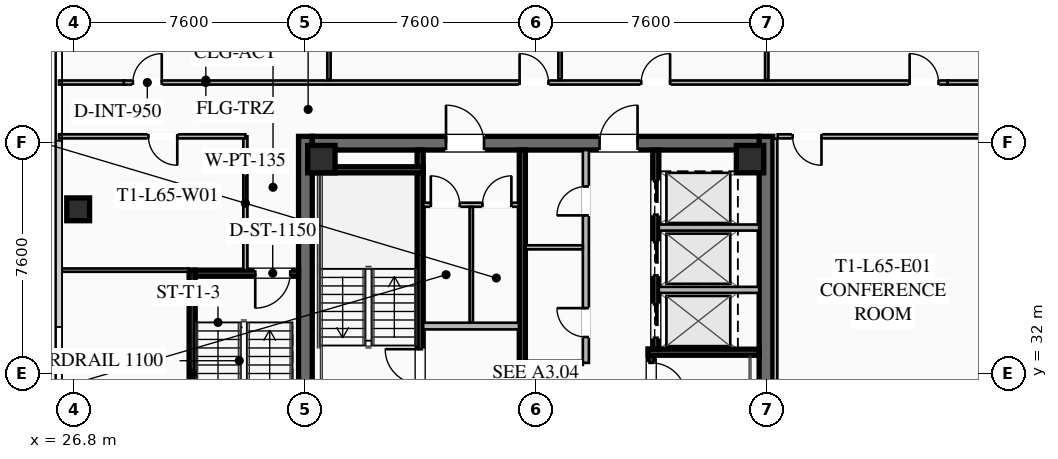
"""IFC4 building model, lengths in metres.
Left out: names, types, materials, properties, quantities, classifications, styles, units other than length and angle.
Written with IfcOpenShell. Run it as: python <this file> out.ifc"""

import sys

from ifc_helpers import new_model, si_unit, direction, frame, frame_2d, origin, origin_2d, place, context, subcontext, project, spatial, rectangle, hollow_rectangle, extrude, element, fill, save


model = new_model("IFC4")
c1 = context("Model", 3, precision=1e-05, world=origin(), true_north=direction((0.0, 1.0)))
c2 = subcontext(c1, "Body", "Model", "MODEL_VIEW")
j1 = project(units=[si_unit("LENGTHUNIT", "METRE"), si_unit("PLANEANGLEUNIT", "RADIAN")], contexts=[c1])
p1 = place(None, origin())
s1 = spatial("IfcSite", under=j1, at=p1, CompositionType="ELEMENT")
p2 = place(p1, origin())
s2 = spatial("IfcBuilding", under=s1, at=p2, CompositionType="ELEMENT")
p3 = place(p2, frame((0.0, 0.0, 239.7)))
s3 = spatial("IfcBuildingStorey", under=s2, at=p3, CompositionType="ELEMENT", Elevation=239.7)
for number, where, z_axis, x_axis in (
    (1, (34.425, 24.2, 0.0), (0.0, 0.0, 1.0), (0.0, 1.0, 0.0)),
    (2, (49.575, 39.8, 0.0), (0.0, 0.0, 1.0), (0.0, -1.0, 0.0)),
):
    element("IfcWall", number, at=place(p3, frame(where, z_axis=z_axis, x_axis=x_axis)), inside=s3, PredefinedType="SHEAR", context=c2, shape_type="SweptSolid", body=[
        extrude(rectangle(XDim=15.6, YDim=0.45, at=frame_2d((7.8, 0.0))), origin(), (0.0, 0.0, 1.0), 3.55),
    ])
p4 = place(p3, frame((34.65, 39.575, 0.0), z_axis=(0.0, 0.0, 1.0), x_axis=(1.0, 0.0, 0.0)))
e3 = element("IfcWall", 3, at=p4, inside=s3, PredefinedType="SHEAR", context=c2, shape_type="SweptSolid", body=[
    extrude(rectangle(XDim=14.7, YDim=0.45, at=frame_2d((7.35, 0.0))), origin(), (0.0, 0.0, 1.0), 3.55),
])
p5 = place(p4, frame((4.4, 0.0, 0.0)))
e4 = element("IfcOpeningElement", 4, at=p5, cuts=e3, PredefinedType="OPENING", context=c2, shape_type="SweptSolid", body=[
    extrude(rectangle(XDim=1.25, YDim=2.25, at=frame_2d((0.625, 1.125))), frame((0.0, 0.235, 0.0), z_axis=(0.0, -1.0, 0.0), x_axis=(1.0, 0.0, 0.0)), (0.0, 0.0, 1.0), 0.47),
])
p6 = place(p4, frame((9.45, 0.0, 0.0)))
e5 = element("IfcOpeningElement", 5, at=p6, cuts=e3, PredefinedType="OPENING", context=c2, shape_type="SweptSolid", body=[
    extrude(rectangle(XDim=1.25, YDim=2.25, at=frame_2d((0.625, 1.125))), frame((0.0, 0.235, 0.0), z_axis=(0.0, -1.0, 0.0), x_axis=(1.0, 0.0, 0.0)), (0.0, 0.0, 1.0), 0.47),
])
for number, where, z_axis, x_axis in (
    (6, (49.05, 39.05, 0.0), (0.0, 0.0, 1.0), (1.0, 0.0, 0.0)),
    (7, (34.95, 39.05, 0.0), (0.0, 0.0, 1.0), (1.0, 0.0, 0.0)),
):
    element("IfcColumn", number, at=place(p3, frame(where, z_axis=z_axis, x_axis=x_axis)), inside=s3, PredefinedType="COLUMN", context=c2, shape_type="SweptSolid", body=[
        extrude(hollow_rectangle(XDim=0.9, YDim=0.9, WallThickness=0.04, at=origin_2d()), origin(), (0.0, 0.0, 1.0), 3.37),
    ])
p7 = place(p3, frame((26.95, 37.4, 0.0), z_axis=(0.0, 0.0, 1.0), x_axis=(1.0, 0.0, 0.0)))
e8 = element("IfcColumn", 8, at=p7, inside=s3, PredefinedType="COLUMN", context=c2, shape_type="SweptSolid", body=[
    extrude(hollow_rectangle(XDim=0.75, YDim=0.75, WallThickness=0.032, at=origin_2d()), origin(), (0.0, 0.0, 1.0), 3.37),
])
p8 = place(p3, frame((38.2, 31.2, 0.0), z_axis=(0.0, 0.0, 1.0), x_axis=(0.0, 1.0, 0.0)))
e9 = element("IfcWall", 9, at=p8, inside=s3, PredefinedType="SHEAR", context=c2, shape_type="SweptSolid", body=[
    extrude(rectangle(XDim=8.15, YDim=0.2, at=frame_2d((4.075, 0.0))), origin(), (0.0, 0.0, 1.0), 3.37),
])
p9 = place(p8, frame((0.45, 0.0, 0.0)))
e10 = element("IfcOpeningElement", 10, at=p9, cuts=e9, PredefinedType="OPENING", context=c2, shape_type="SweptSolid", body=[
    extrude(rectangle(XDim=1.15, YDim=2.2, at=frame_2d((0.575, 1.1))), frame((0.0, 0.11, 0.0), z_axis=(0.0, -1.0, 0.0), x_axis=(1.0, 0.0, 0.0)), (0.0, 0.0, 1.0), 0.22),
])
p10 = place(p3, frame((34.65, 38.7, 0.0), z_axis=(0.0, 0.0, 1.0), x_axis=(1.0, 0.0, 0.0)))
e11 = element("IfcWall", 11, at=p10, inside=s3, PredefinedType="SHEAR", context=c2, shape_type="SweptSolid", body=[
    extrude(rectangle(XDim=3.65, YDim=0.2, at=frame_2d((1.825, 0.0))), origin(), (0.0, 0.0, 1.0), 3.37),
])
p11 = place(p3, frame((45.8, 32.8, 0.0), z_axis=(0.0, 0.0, 1.0), x_axis=(0.0, -1.0, 0.0)))
e12 = element("IfcWall", 12, at=p11, inside=s3, PredefinedType="SHEAR", context=c2, shape_type="SweptSolid", body=[
    extrude(rectangle(XDim=8.15, YDim=0.2, at=frame_2d((4.075, 0.0))), origin(), (0.0, 0.0, 1.0), 3.37),
])
p12 = place(p11, frame((0.45, 0.0, 0.0)))
e13 = element("IfcOpeningElement", 13, at=p12, cuts=e12, PredefinedType="OPENING", context=c2, shape_type="SweptSolid", body=[
    extrude(rectangle(XDim=1.15, YDim=2.2, at=frame_2d((0.575, 1.1))), frame((0.0, 0.11, 0.0), z_axis=(0.0, -1.0, 0.0), x_axis=(1.0, 0.0, 0.0)), (0.0, 0.0, 1.0), 0.22),
])
p13 = place(p3, frame((45.7, 32.7, 0.0), z_axis=(0.0, 0.0, 1.0), x_axis=(1.0, 0.0, 0.0)))
e14 = element("IfcWall", 14, at=p13, inside=s3, PredefinedType="SHEAR", context=c2, shape_type="SweptSolid", body=[
    extrude(rectangle(XDim=3.65, YDim=0.2, at=frame_2d((1.825, 0.0))), origin(), (0.0, 0.0, 1.0), 3.37),
])
p14 = place(p3, frame((41.56, 24.65, 0.0), z_axis=(0.0, 0.0, 1.0), x_axis=(0.0, 1.0, 0.0)))
e15 = element("IfcWall", 15, at=p14, inside=s3, PredefinedType="SHEAR", context=c2, shape_type="SweptSolid", body=[
    extrude(rectangle(XDim=14.7, YDim=0.2, at=frame_2d((7.35, 0.0))), origin(), (0.0, 0.0, 1.0), 3.37),
])
p15 = place(p3, frame((38.3, 33.56, 0.0), z_axis=(0.0, 0.0, 1.0), x_axis=(1.0, 0.0, 0.0)))
e16 = element("IfcWall", 16, at=p15, inside=s3, PredefinedType="SOLIDWALL", context=c2, shape_type="SweptSolid", body=[
    extrude(rectangle(XDim=3.15, YDim=0.22, at=frame_2d((1.575, 0.0))), origin(), (0.0, 0.0, 1.0), 2.723),
])
p16 = place(p3, frame((45.95, 39.35, 0.0), z_axis=(0.0, 0.0, 1.0), x_axis=(0.0, -1.0, 0.0)))
e17 = element("IfcWall", 17, at=p16, inside=s3, PredefinedType="SHEAR", context=c2, shape_type="SweptSolid", body=[
    extrude(rectangle(XDim=6.55, YDim=0.2, at=frame_2d((3.275, 0.0))), origin(), (0.0, 0.0, 1.0), 3.37),
])
p17 = place(p16, frame((5.075, 0.0, 0.0)))
e18 = element("IfcOpeningElement", 18, at=p17, cuts=e17, PredefinedType="OPENING", context=c2, shape_type="SweptSolid", body=[
    extrude(rectangle(XDim=1.1, YDim=2.2, at=frame_2d((0.55, 1.1))), frame((0.0, 0.11, 0.0), z_axis=(0.0, -1.0, 0.0), x_axis=(1.0, 0.0, 0.0)), (0.0, 0.0, 1.0), 0.22),
])
p18 = place(p16, frame((3.025, 0.0, 0.0)))
e19 = element("IfcOpeningElement", 19, at=p18, cuts=e17, PredefinedType="OPENING", context=c2, shape_type="SweptSolid", body=[
    extrude(rectangle(XDim=1.1, YDim=2.2, at=frame_2d((0.55, 1.1))), frame((0.0, 0.11, 0.0), z_axis=(0.0, -1.0, 0.0), x_axis=(1.0, 0.0, 0.0)), (0.0, 0.0, 1.0), 0.22),
])
p19 = place(p16, frame((1.025, 0.0, 0.0)))
e20 = element("IfcOpeningElement", 20, at=p19, cuts=e17, PredefinedType="OPENING", context=c2, shape_type="SweptSolid", body=[
    extrude(rectangle(XDim=1.1, YDim=2.2, at=frame_2d((0.55, 1.1))), frame((0.0, 0.11, 0.0), z_axis=(0.0, -1.0, 0.0), x_axis=(1.0, 0.0, 0.0)), (0.0, 0.0, 1.0), 0.22),
])
for number, where, z_axis, x_axis in (
    (21, (46.05, 34.75, 0.0), (0.0, 0.0, 1.0), (1.0, 0.0, 0.0)),
    (22, (46.05, 36.8, 0.0), (0.0, 0.0, 1.0), (1.0, 0.0, 0.0)),
):
    element("IfcWall", number, at=place(p3, frame(where, z_axis=z_axis, x_axis=x_axis)), inside=s3, PredefinedType="SOLIDWALL", context=c2, shape_type="SweptSolid", body=[
        extrude(rectangle(XDim=3.3, YDim=0.2, at=frame_2d((1.65, 0.0))), origin(), (0.0, 0.0, 1.0), 3.37),
    ])
p20 = place(p3, frame((38.3, 37.55, 0.0), z_axis=(0.0, 0.0, 1.0), x_axis=(1.0, 0.0, 0.0)))
e23 = element("IfcWall", 23, at=p20, inside=s3, PredefinedType="PARTITIONING", context=c2, shape_type="SweptSolid", body=[
    extrude(rectangle(XDim=3.15, YDim=0.135, at=frame_2d((1.575, 0.0))), origin(), (0.0, 0.0, 1.0), 2.723),
])
p21 = place(p20, frame((0.25, 0.0, 0.0)))
e24 = element("IfcOpeningElement", 24, at=p21, cuts=e23, PredefinedType="OPENING", context=c2, shape_type="SweptSolid", body=[
    extrude(rectangle(XDim=0.95, YDim=2.05, at=frame_2d((0.475, 1.025))), frame((0.0, 0.077, 0.0), z_axis=(0.0, -1.0, 0.0), x_axis=(1.0, 0.0, 0.0)), (0.0, 0.0, 1.0), 0.155),
])
p22 = place(p20, frame((1.95, 0.0, 0.0)))
e25 = element("IfcOpeningElement", 25, at=p22, cuts=e23, PredefinedType="OPENING", context=c2, shape_type="SweptSolid", body=[
    extrude(rectangle(XDim=0.95, YDim=2.05, at=frame_2d((0.475, 1.025))), frame((0.0, 0.077, 0.0), z_axis=(0.0, -1.0, 0.0), x_axis=(1.0, 0.0, 0.0)), (0.0, 0.0, 1.0), 0.155),
])
p23 = place(p3, frame((39.88, 33.68, 0.0), z_axis=(0.0, 0.0, 1.0), x_axis=(0.0, 1.0, 0.0)))
e26 = element("IfcWall", 26, at=p23, inside=s3, PredefinedType="PARTITIONING", context=c2, shape_type="SweptSolid", body=[
    extrude(rectangle(XDim=3.8, YDim=0.11, at=frame_2d((1.9, 0.0))), origin(), (0.0, 0.0, 1.0), 2.723),
])
p24 = place(p3, frame((43.65, 32.35, 0.0), z_axis=(0.0, 0.0, 1.0), x_axis=(0.0, 1.0, 0.0)))
e27 = element("IfcWall", 27, at=p24, inside=s3, PredefinedType="SOLIDWALL", context=c2, shape_type="SweptSolid", body=[
    extrude(rectangle(XDim=7.0, YDim=0.2, at=frame_2d((3.5, 0.0))), origin(), (0.0, 0.0, 1.0), 2.723),
])
p25 = place(p24, frame((0.85, 0.0, 0.0)))
e28 = element("IfcOpeningElement", 28, at=p25, cuts=e27, PredefinedType="OPENING", context=c2, shape_type="SweptSolid", body=[
    extrude(rectangle(XDim=0.95, YDim=2.05, at=frame_2d((0.475, 1.025))), frame((0.0, 0.11, 0.0), z_axis=(0.0, -1.0, 0.0), x_axis=(1.0, 0.0, 0.0)), (0.0, 0.0, 1.0), 0.22),
])
p26 = place(p24, frame((4.85, 0.0, 0.0)))
e29 = element("IfcOpeningElement", 29, at=p26, cuts=e27, PredefinedType="OPENING", context=c2, shape_type="SweptSolid", body=[
    extrude(rectangle(XDim=0.95, YDim=2.05, at=frame_2d((0.475, 1.025))), frame((0.0, 0.11, 0.0), z_axis=(0.0, -1.0, 0.0), x_axis=(1.0, 0.0, 0.0)), (0.0, 0.0, 1.0), 0.22),
])
for number, where, z_axis, x_axis in (
    (30, (41.67, 32.35, 0.0), (0.0, 0.0, 1.0), (1.0, 0.0, 0.0)),
    (31, (41.67, 36.15, 0.0), (0.0, 0.0, 1.0), (1.0, 0.0, 0.0)),
):
    element("IfcWall", number, at=place(p3, frame(where, z_axis=z_axis, x_axis=x_axis)), inside=s3, PredefinedType="PARTITIONING", context=c2, shape_type="SweptSolid", body=[
        extrude(rectangle(XDim=1.88, YDim=0.135, at=frame_2d((0.94, 0.0))), origin(), (0.0, 0.0, 1.0), 2.723),
    ])
p27 = place(p3, frame((30.7, 28.6, 0.0), z_axis=(0.0, 0.0, 1.0), x_axis=(0.0, 1.0, 0.0)))
e32 = element("IfcWall", 32, at=p27, inside=s3, PredefinedType="SHEAR", context=c2, shape_type="SweptSolid", body=[
    extrude(rectangle(XDim=6.8, YDim=0.2, at=frame_2d((3.4, 0.0))), origin(), (0.0, 0.0, 1.0), 3.37),
])
p28 = place(p3, frame((34.2, 35.3, 0.0), z_axis=(0.0, 0.0, 1.0), x_axis=(-1.0, 0.0, 0.0)))
e33 = element("IfcWall", 33, at=p28, inside=s3, PredefinedType="SHEAR", context=c2, shape_type="SweptSolid", body=[
    extrude(rectangle(XDim=3.4, YDim=0.2, at=frame_2d((1.7, 0.0))), origin(), (0.0, 0.0, 1.0), 3.37),
])
p29 = place(p28, frame((0.275, 0.0, 0.0)))
e34 = element("IfcOpeningElement", 34, at=p29, cuts=e33, PredefinedType="OPENING", context=c2, shape_type="SweptSolid", body=[
    extrude(rectangle(XDim=1.15, YDim=2.2, at=frame_2d((0.575, 1.1))), frame((0.0, 0.11, 0.0), z_axis=(0.0, -1.0, 0.0), x_axis=(1.0, 0.0, 0.0)), (0.0, 0.0, 1.0), 0.22),
])
p30 = place(p3, frame((32.45, 35.4, 0.0), z_axis=(0.0, 0.0, 1.0), x_axis=(0.0, 1.0, 0.0)))
e35 = element("IfcWall", 35, at=p30, inside=s3, PredefinedType="PARTITIONING", context=c2, shape_type="SweptSolid", body=[
    extrude(rectangle(XDim=4.4, YDim=0.135, at=frame_2d((2.2, 0.0))), origin(), (0.0, 0.0, 1.0), 2.723),
])
p31 = place(p3, frame((28.45, 41.57, 0.0), z_axis=(0.0, 0.0, 1.0), x_axis=(1.0, 0.0, 0.0)))
e36 = element("IfcWall", 36, at=p31, inside=s3, PredefinedType="PARTITIONING", context=c2, shape_type="SweptSolid", body=[
    extrude(rectangle(XDim=27.1, YDim=0.135, at=frame_2d((13.55, 0.0))), origin(), (0.0, 0.0, 1.0), 2.723),
])
p32 = place(p31, frame((0.3, 0.0, 0.0)))
e37 = element("IfcOpeningElement", 37, at=p32, cuts=e36, PredefinedType="OPENING", context=c2, shape_type="SweptSolid", body=[
    extrude(rectangle(XDim=0.95, YDim=2.05, at=frame_2d((0.475, 1.025))), frame((0.0, 0.077, 0.0), z_axis=(0.0, -1.0, 0.0), x_axis=(1.0, 0.0, 0.0)), (0.0, 0.0, 1.0), 0.155),
])
p33 = place(p31, frame((13.02, 0.0, 0.0)))
e38 = element("IfcOpeningElement", 38, at=p33, cuts=e36, PredefinedType="OPENING", context=c2, shape_type="SweptSolid", body=[
    extrude(rectangle(XDim=0.95, YDim=2.05, at=frame_2d((0.475, 1.025))), frame((0.0, 0.077, 0.0), z_axis=(0.0, -1.0, 0.0), x_axis=(1.0, 0.0, 0.0)), (0.0, 0.0, 1.0), 0.155),
])
p34 = place(p31, frame((17.021, 0.0, 0.0)))
e39 = element("IfcOpeningElement", 39, at=p34, cuts=e36, PredefinedType="OPENING", context=c2, shape_type="SweptSolid", body=[
    extrude(rectangle(XDim=0.95, YDim=2.05, at=frame_2d((0.475, 1.025))), frame((0.0, 0.077, 0.0), z_axis=(0.0, -1.0, 0.0), x_axis=(1.0, 0.0, 0.0)), (0.0, 0.0, 1.0), 0.155),
])
p35 = place(p31, frame((25.85, 0.0, 0.0)))
e40 = element("IfcOpeningElement", 40, at=p35, cuts=e36, PredefinedType="OPENING", context=c2, shape_type="SweptSolid", body=[
    extrude(rectangle(XDim=0.95, YDim=2.05, at=frame_2d((0.475, 1.025))), frame((0.0, 0.077, 0.0), z_axis=(0.0, -1.0, 0.0), x_axis=(1.0, 0.0, 0.0)), (0.0, 0.0, 1.0), 0.155),
])
for number, where, z_axis, x_axis in (
    (41, (26.32, 41.57, 0.0), (0.0, 0.0, 1.0), (1.0, 0.0, 0.0)),
    (42, (55.55, 41.57, 0.0), (0.0, 0.0, 1.0), (1.0, 0.0, 0.0)),
):
    element("IfcWall", number, at=place(p3, frame(where, z_axis=z_axis, x_axis=x_axis)), inside=s3, PredefinedType="PARTITIONING", context=c2, shape_type="SweptSolid", body=[
        extrude(rectangle(XDim=2.13, YDim=0.135, at=frame_2d((1.065, 0.0))), origin(), (0.0, 0.0, 1.0), 2.723),
    ])
for number, where, z_axis, x_axis in (
    (43, (35.2, 41.65, 0.0), (0.0, 0.0, 1.0), (0.0, 1.0, 0.0)),
    (44, (42.8, 41.65, 0.0), (0.0, 0.0, 1.0), (0.0, 1.0, 0.0)),
    (45, (49.6, 41.65, 0.0), (0.0, 0.0, 1.0), (0.0, 1.0, 0.0)),
):
    element("IfcWall", number, at=place(p3, frame(where, z_axis=z_axis, x_axis=x_axis)), inside=s3, PredefinedType="PARTITIONING", context=c2, shape_type="SweptSolid", body=[
        extrude(rectangle(XDim=6.03, YDim=0.11, at=frame_2d((3.015, 0.0))), origin(), (0.0, 0.0, 1.0), 2.723),
    ])
p36 = place(p3, frame((49.88, 39.72, 0.0), z_axis=(0.0, 0.0, 1.0), x_axis=(0.0, -1.0, 0.0)))
e46 = element("IfcWall", 46, at=p36, inside=s3, PredefinedType="PARTITIONING", context=c2, shape_type="SweptSolid", body=[
    extrude(rectangle(XDim=15.44, YDim=0.135, at=frame_2d((7.72, 0.0))), origin(), (0.0, 0.0, 1.0), 2.723),
])
p37 = place(p3, frame((57.68, 39.8, 0.0), z_axis=(0.0, 0.0, 1.0), x_axis=(-1.0, 0.0, 0.0)))
e47 = element("IfcWall", 47, at=p37, inside=s3, PredefinedType="PARTITIONING", context=c2, shape_type="SweptSolid", body=[
    extrude(rectangle(XDim=7.72, YDim=0.135, at=frame_2d((3.86, 0.0))), origin(), (0.0, 0.0, 1.0), 2.723),
])
p38 = place(p37, frame((6.28, 0.0, 0.0)))
e48 = element("IfcOpeningElement", 48, at=p38, cuts=e47, PredefinedType="OPENING", context=c2, shape_type="SweptSolid", body=[
    extrude(rectangle(XDim=0.95, YDim=2.05, at=frame_2d((0.475, 1.025))), frame((0.0, 0.077, 0.0), z_axis=(0.0, -1.0, 0.0), x_axis=(1.0, 0.0, 0.0)), (0.0, 0.0, 1.0), 0.155),
])
p39 = place(p3, frame((32.45, 39.8, 0.0), z_axis=(0.0, 0.0, 1.0), x_axis=(-1.0, 0.0, 0.0)))
e49 = element("IfcWall", 49, at=p39, inside=s3, PredefinedType="PARTITIONING", context=c2, shape_type="SweptSolid", body=[
    extrude(rectangle(XDim=6.13, YDim=0.135, at=frame_2d((3.065, 0.0))), origin(), (0.0, 0.0, 1.0), 2.723),
])
p40 = place(p39, frame((2.24, 0.0, 0.0)))
e50 = element("IfcOpeningElement", 50, at=p40, cuts=e49, PredefinedType="OPENING", context=c2, shape_type="SweptSolid", body=[
    extrude(rectangle(XDim=0.95, YDim=2.05, at=frame_2d((0.475, 1.025))), frame((0.0, 0.077, 0.0), z_axis=(0.0, -1.0, 0.0), x_axis=(1.0, 0.0, 0.0)), (0.0, 0.0, 1.0), 0.155),
])
p41 = place(p3, frame((30.6, 35.4, 0.0), z_axis=(0.0, 0.0, 1.0), x_axis=(-1.0, 0.0, 0.0)))
e51 = element("IfcWall", 51, at=p41, inside=s3, PredefinedType="PARTITIONING", context=c2, shape_type="SweptSolid", body=[
    extrude(rectangle(XDim=4.28, YDim=0.11, at=frame_2d((2.14, 0.0))), origin(), (0.0, 0.0, 1.0), 2.723),
])
p42 = place(p5, origin())
e52 = element("IfcDoor", 52, at=p42, inside=s3, OperationType="SINGLE_SWING_LEFT", PredefinedType="DOOR", context=c2, shape_type="SweptSolid", body=[
    extrude(rectangle(XDim=1.25, YDim=2.25, at=frame_2d((0.625, 1.125))), frame((0.0, 0.025, 0.0), z_axis=(0.0, -1.0, 0.0), x_axis=(1.0, 0.0, 0.0)), (0.0, 0.0, 1.0), 0.05),
])
fill(e4, e52)
p43 = place(p6, origin())
e53 = element("IfcDoor", 53, at=p43, inside=s3, OperationType="SINGLE_SWING_RIGHT", PredefinedType="DOOR", context=c2, shape_type="SweptSolid", body=[
    extrude(rectangle(XDim=1.25, YDim=2.25, at=frame_2d((0.625, 1.125))), frame((0.0, 0.025, 0.0), z_axis=(0.0, -1.0, 0.0), x_axis=(1.0, 0.0, 0.0)), (0.0, 0.0, 1.0), 0.05),
])
fill(e5, e53)
p44 = place(p9, origin())
e54 = element("IfcDoor", 54, at=p44, inside=s3, OperationType="SINGLE_SWING_RIGHT", PredefinedType="DOOR", context=c2, shape_type="SweptSolid", body=[
    extrude(rectangle(XDim=1.15, YDim=2.2, at=frame_2d((0.575, 1.1))), frame((0.0, 0.025, 0.0), z_axis=(0.0, -1.0, 0.0), x_axis=(1.0, 0.0, 0.0)), (0.0, 0.0, 1.0), 0.05),
])
fill(e10, e54)
p45 = place(p12, origin())
e55 = element("IfcDoor", 55, at=p45, inside=s3, OperationType="SINGLE_SWING_RIGHT", PredefinedType="DOOR", context=c2, shape_type="SweptSolid", body=[
    extrude(rectangle(XDim=1.15, YDim=2.2, at=frame_2d((0.575, 1.1))), frame((0.0, 0.025, 0.0), z_axis=(0.0, -1.0, 0.0), x_axis=(1.0, 0.0, 0.0)), (0.0, 0.0, 1.0), 0.05),
])
fill(e13, e55)
p46 = place(p21, origin())
e56 = element("IfcDoor", 56, at=p46, inside=s3, OperationType="SINGLE_SWING_LEFT", PredefinedType="DOOR", context=c2, shape_type="SweptSolid", body=[
    extrude(rectangle(XDim=0.95, YDim=2.05, at=frame_2d((0.475, 1.025))), frame((0.0, 0.025, 0.0), z_axis=(0.0, -1.0, 0.0), x_axis=(1.0, 0.0, 0.0)), (0.0, 0.0, 1.0), 0.05),
])
fill(e24, e56)
p47 = place(p22, origin())
e57 = element("IfcDoor", 57, at=p47, inside=s3, OperationType="SINGLE_SWING_RIGHT", PredefinedType="DOOR", context=c2, shape_type="SweptSolid", body=[
    extrude(rectangle(XDim=0.95, YDim=2.05, at=frame_2d((0.475, 1.025))), frame((0.0, 0.025, 0.0), z_axis=(0.0, -1.0, 0.0), x_axis=(1.0, 0.0, 0.0)), (0.0, 0.0, 1.0), 0.05),
])
fill(e25, e57)
p48 = place(p25, origin())
e58 = element("IfcDoor", 58, at=p48, inside=s3, OperationType="SINGLE_SWING_RIGHT", PredefinedType="DOOR", context=c2, shape_type="SweptSolid", body=[
    extrude(rectangle(XDim=0.95, YDim=2.05, at=frame_2d((0.475, 1.025))), frame((0.0, 0.025, 0.0), z_axis=(0.0, -1.0, 0.0), x_axis=(1.0, 0.0, 0.0)), (0.0, 0.0, 1.0), 0.05),
])
fill(e28, e58)
p49 = place(p26, origin())
e59 = element("IfcDoor", 59, at=p49, inside=s3, OperationType="SINGLE_SWING_LEFT", PredefinedType="DOOR", context=c2, shape_type="SweptSolid", body=[
    extrude(rectangle(XDim=0.95, YDim=2.05, at=frame_2d((0.475, 1.025))), frame((0.0, 0.025, 0.0), z_axis=(0.0, -1.0, 0.0), x_axis=(1.0, 0.0, 0.0)), (0.0, 0.0, 1.0), 0.05),
])
fill(e29, e59)
p50 = place(p29, origin())
e60 = element("IfcDoor", 60, at=p50, inside=s3, OperationType="SINGLE_SWING_RIGHT", PredefinedType="DOOR", context=c2, shape_type="SweptSolid", body=[
    extrude(rectangle(XDim=1.15, YDim=2.2, at=frame_2d((0.575, 1.1))), frame((0.0, 0.025, 0.0), z_axis=(0.0, -1.0, 0.0), x_axis=(1.0, 0.0, 0.0)), (0.0, 0.0, 1.0), 0.05),
])
fill(e34, e60)
p51 = place(p32, origin())
e61 = element("IfcDoor", 61, at=p51, inside=s3, OperationType="SINGLE_SWING_RIGHT", PredefinedType="DOOR", context=c2, shape_type="SweptSolid", body=[
    extrude(rectangle(XDim=0.95, YDim=2.05, at=frame_2d((0.475, 1.025))), frame((0.0, 0.025, 0.0), z_axis=(0.0, -1.0, 0.0), x_axis=(1.0, 0.0, 0.0)), (0.0, 0.0, 1.0), 0.05),
])
fill(e37, e61)
p52 = place(p33, origin())
e62 = element("IfcDoor", 62, at=p52, inside=s3, OperationType="SINGLE_SWING_LEFT", PredefinedType="DOOR", context=c2, shape_type="SweptSolid", body=[
    extrude(rectangle(XDim=0.95, YDim=2.05, at=frame_2d((0.475, 1.025))), frame((0.0, 0.025, 0.0), z_axis=(0.0, -1.0, 0.0), x_axis=(1.0, 0.0, 0.0)), (0.0, 0.0, 1.0), 0.05),
])
fill(e38, e62)
p53 = place(p34, origin())
e63 = element("IfcDoor", 63, at=p53, inside=s3, OperationType="SINGLE_SWING_RIGHT", PredefinedType="DOOR", context=c2, shape_type="SweptSolid", body=[
    extrude(rectangle(XDim=0.95, YDim=2.05, at=frame_2d((0.475, 1.025))), frame((0.0, 0.025, 0.0), z_axis=(0.0, -1.0, 0.0), x_axis=(1.0, 0.0, 0.0)), (0.0, 0.0, 1.0), 0.05),
])
fill(e39, e63)
p54 = place(p35, origin())
e64 = element("IfcDoor", 64, at=p54, inside=s3, OperationType="SINGLE_SWING_LEFT", PredefinedType="DOOR", context=c2, shape_type="SweptSolid", body=[
    extrude(rectangle(XDim=0.95, YDim=2.05, at=frame_2d((0.475, 1.025))), frame((0.0, 0.025, 0.0), z_axis=(0.0, -1.0, 0.0), x_axis=(1.0, 0.0, 0.0)), (0.0, 0.0, 1.0), 0.05),
])
fill(e40, e64)
p55 = place(p38, origin())
e65 = element("IfcDoor", 65, at=p55, inside=s3, OperationType="SINGLE_SWING_LEFT", PredefinedType="DOOR", context=c2, shape_type="SweptSolid", body=[
    extrude(rectangle(XDim=0.95, YDim=2.05, at=frame_2d((0.475, 1.025))), frame((0.0, 0.025, 0.0), z_axis=(0.0, -1.0, 0.0), x_axis=(1.0, 0.0, 0.0)), (0.0, 0.0, 1.0), 0.05),
])
fill(e48, e65)
p56 = place(p40, origin())
e66 = element("IfcDoor", 66, at=p56, inside=s3, OperationType="SINGLE_SWING_LEFT", PredefinedType="DOOR", context=c2, shape_type="SweptSolid", body=[
    extrude(rectangle(XDim=0.95, YDim=2.05, at=frame_2d((0.475, 1.025))), frame((0.0, 0.025, 0.0), z_axis=(0.0, -1.0, 0.0), x_axis=(1.0, 0.0, 0.0)), (0.0, 0.0, 1.0), 0.05),
])
fill(e50, e66)
p57 = place(p17, origin())
e67 = element("IfcDoor", 67, at=p57, inside=s3, OperationType="SLIDING_TO_LEFT", PredefinedType="DOOR", context=c2, shape_type="SweptSolid", body=[
    extrude(rectangle(XDim=1.1, YDim=2.2, at=frame_2d((0.55, 1.1))), frame((0.0, 0.025, 0.0), z_axis=(0.0, -1.0, 0.0), x_axis=(1.0, 0.0, 0.0)), (0.0, 0.0, 1.0), 0.05),
])
fill(e18, e67)
p58 = place(p18, origin())
e68 = element("IfcDoor", 68, at=p58, inside=s3, OperationType="SLIDING_TO_LEFT", PredefinedType="DOOR", context=c2, shape_type="SweptSolid", body=[
    extrude(rectangle(XDim=1.1, YDim=2.2, at=frame_2d((0.55, 1.1))), frame((0.0, 0.025, 0.0), z_axis=(0.0, -1.0, 0.0), x_axis=(1.0, 0.0, 0.0)), (0.0, 0.0, 1.0), 0.05),
])
fill(e19, e68)
p59 = place(p19, origin())
e69 = element("IfcDoor", 69, at=p59, inside=s3, OperationType="SLIDING_TO_LEFT", PredefinedType="DOOR", context=c2, shape_type="SweptSolid", body=[
    extrude(rectangle(XDim=1.1, YDim=2.2, at=frame_2d((0.55, 1.1))), frame((0.0, 0.025, 0.0), z_axis=(0.0, -1.0, 0.0), x_axis=(1.0, 0.0, 0.0)), (0.0, 0.0, 1.0), 0.05),
])
fill(e20, e69)
save(model, sys.argv[1])
